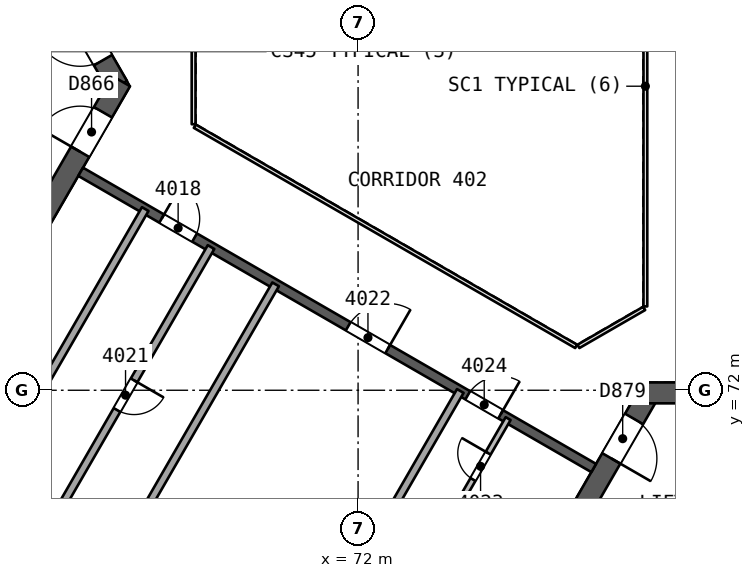
"""IFC4 building model, lengths in metres.
Left out: names, types, materials, properties, quantities, classifications, styles, units other than length and angle.
Written with IfcOpenShell. Run it as: python <this file> out.ifc"""

import sys

from ifc_helpers import new_model, si_unit, direction, frame, frame_2d, origin, place, context, subcontext, project, spatial, rectangle, extrude, element, fill, save


model = new_model("IFC4")
c1 = context("Model", 3, precision=1e-05, world=origin(), true_north=direction((0.0, 1.0)))
c2 = subcontext(c1, "Body", "Model", "MODEL_VIEW")
j1 = project(units=[si_unit("LENGTHUNIT", "METRE"), si_unit("PLANEANGLEUNIT", "RADIAN")], contexts=[c1])
p1 = place(None, origin())
s1 = spatial("IfcSite", under=j1, at=p1, CompositionType="ELEMENT")
p2 = place(p1, origin())
s2 = spatial("IfcBuilding", under=s1, at=p2, CompositionType="ELEMENT")
p3 = place(p2, frame((0.0, 0.0, 167.4)))
s3 = spatial("IfcBuildingStorey", under=s2, at=p3, CompositionType="ELEMENT", Elevation=167.4)
p4 = place(p3, frame((65.682, 80.0, 0.0), z_axis=(0.0, 0.0, 1.0), x_axis=(-0.500000202252, 0.866025287014, 0.0)))
e1 = element("IfcWall", 1, at=p4, inside=s3, PredefinedType="SHEAR", context=c2, shape_type="SweptSolid", body=[
    extrude(rectangle(XDim=10.221, YDim=0.55, at=frame_2d((5.111, 0.0))), origin(), (0.0, 0.0, 1.0), 3.7),
])
p5 = place(p4, frame((0.791, 0.0, 0.0)))
e2 = element("IfcOpeningElement", 2, at=p5, cuts=e1, PredefinedType="OPENING", context=c2, shape_type="SweptSolid", body=[
    extrude(rectangle(XDim=1.2, YDim=2.1, at=frame_2d((0.6, 1.05))), frame((0.0, 0.286, 0.0), z_axis=(0.0, -1.0, 0.0), x_axis=(1.0, 0.0, 0.0)), (0.0, 0.0, 1.0), 0.571),
])
p6 = place(p3, frame((60.709, 71.386, 0.0), z_axis=(0.0, 0.0, 1.0), x_axis=(0.500015938302, 0.866016201606, 0.0)))
e3 = element("IfcWall", 3, at=p6, inside=s3, PredefinedType="SHEAR", context=c2, shape_type="SweptSolid", body=[
    extrude(rectangle(XDim=10.105, YDim=0.55, at=frame_2d((5.053, 0.0))), origin(), (0.0, 0.0, 1.0), 3.7),
])
p7 = place(p6, frame((7.955, 0.0, 0.0)))
e4 = element("IfcOpeningElement", 4, at=p7, cuts=e3, PredefinedType="OPENING", context=c2, shape_type="SweptSolid", body=[
    extrude(rectangle(XDim=1.2, YDim=2.1, at=frame_2d((0.6, 1.05))), frame((0.0, 0.286, 0.0), z_axis=(0.0, -1.0, 0.0), x_axis=(1.0, 0.0, 0.0)), (0.0, 0.0, 1.0), 0.571),
])
p8 = place(p3, frame((79.659, 71.931, 0.0), z_axis=(0.0, 0.0, 1.0), x_axis=(-0.500000202252, -0.866025287014, 0.0)))
e5 = element("IfcWall", 5, at=p8, inside=s3, PredefinedType="SHEAR", context=c2, shape_type="SweptSolid", body=[
    extrude(rectangle(XDim=10.221, YDim=0.55, at=frame_2d((5.111, 0.0))), origin(), (0.0, 0.0, 1.0), 3.7),
])
p9 = place(p8, frame((0.791, 0.0, 0.0)))
e6 = element("IfcOpeningElement", 6, at=p9, cuts=e5, PredefinedType="OPENING", context=c2, shape_type="SweptSolid", body=[
    extrude(rectangle(XDim=1.2, YDim=2.1, at=frame_2d((0.6, 1.05))), frame((0.0, 0.286, 0.0), z_axis=(0.0, -1.0, 0.0), x_axis=(1.0, 0.0, 0.0)), (0.0, 0.0, 1.0), 0.571),
])
p10 = place(p3, frame((89.605, 71.931, 0.0), z_axis=(0.0, 0.0, 1.0), x_axis=(-1.0, 0.0, 0.0)))
e7 = element("IfcWall", 7, at=p10, inside=s3, PredefinedType="SHEAR", context=c2, shape_type="SweptSolid", body=[
    extrude(rectangle(XDim=10.105, YDim=0.55, at=frame_2d((5.052, 0.0))), origin(), (0.0, 0.0, 1.0), 3.7),
])
p11 = place(p10, frame((7.955, 0.0, 0.0)))
e8 = element("IfcOpeningElement", 8, at=p11, cuts=e7, PredefinedType="OPENING", context=c2, shape_type="SweptSolid", body=[
    extrude(rectangle(XDim=1.2, YDim=2.1, at=frame_2d((0.6, 1.05))), frame((0.0, 0.286, 0.0), z_axis=(0.0, -1.0, 0.0), x_axis=(1.0, 0.0, 0.0)), (0.0, 0.0, 1.0), 0.571),
])
p12 = place(p3, frame((64.7, 77.748, 0.0), z_axis=(0.0, 0.0, 1.0), x_axis=(0.866026492143, -0.499998114903, 0.0)))
e9 = element("IfcWall", 9, at=p12, inside=s3, PredefinedType="SHEAR", context=c2, shape_type="SweptSolid", body=[
    extrude(rectangle(XDim=15.588, YDim=0.25, at=frame_2d((7.794, 0.0))), origin(), (0.0, 0.0, 1.0), 3.25),
])
p13 = place(p12, frame((2.462, 0.0, 0.0)))
e10 = element("IfcOpeningElement", 10, at=p13, cuts=e9, PredefinedType="OPENING", context=c2, shape_type="SweptSolid", body=[
    extrude(rectangle(XDim=1.0, YDim=2.1, at=frame_2d((0.5, 1.05))), frame((0.0, 0.135, 0.0), z_axis=(0.0, -1.0, 0.0), x_axis=(1.0, 0.0, 0.0)), (0.0, 0.0, 1.0), 0.271),
])
p14 = place(p12, frame((8.129, 0.0, 0.0)))
e11 = element("IfcOpeningElement", 11, at=p14, cuts=e9, PredefinedType="OPENING", context=c2, shape_type="SweptSolid", body=[
    extrude(rectangle(XDim=1.2, YDim=2.4, at=frame_2d((0.6, 1.2))), frame((0.0, 0.135, 0.0), z_axis=(0.0, -1.0, 0.0), x_axis=(1.0, 0.0, 0.0)), (0.0, 0.0, 1.0), 0.271),
])
p15 = place(p12, frame((11.762, 0.0, 0.0)))
e12 = element("IfcOpeningElement", 12, at=p15, cuts=e9, PredefinedType="OPENING", context=c2, shape_type="SweptSolid", body=[
    extrude(rectangle(XDim=1.0, YDim=2.1, at=frame_2d((0.5, 1.05))), frame((0.0, 0.135, 0.0), z_axis=(0.0, -1.0, 0.0), x_axis=(1.0, 0.0, 0.0)), (0.0, 0.0, 1.0), 0.271),
])
p16 = place(p3, frame((68.131, 75.767, 0.0), z_axis=(0.0, 0.0, 1.0), x_axis=(-0.5000018851, -0.866024315419, 0.0)))
e13 = element("IfcWall", 13, at=p16, inside=s3, PredefinedType="PARTITIONING", context=c2, shape_type="SweptSolid", body=[
    extrude(rectangle(XDim=9.0, YDim=0.2, at=frame_2d((4.5, 0.0))), origin(), (0.0, 0.0, 1.0), 3.25),
])
p17 = place(p16, frame((4.05, 0.0, 0.0)))
e14 = element("IfcOpeningElement", 14, at=p17, cuts=e13, PredefinedType="OPENING", context=c2, shape_type="SweptSolid", body=[
    extrude(rectangle(XDim=0.9, YDim=2.1, at=frame_2d((0.45, 1.05))), frame((0.0, 0.11, 0.0), z_axis=(0.0, -1.0, 0.0), x_axis=(1.0, 0.0, 0.0)), (0.0, 0.0, 1.0), 0.221),
])
p18 = place(p3, frame((61.899, 68.973, 0.0), z_axis=(0.0, 0.0, 1.0), x_axis=(0.5000018851, 0.866024315419, 0.0)))
e15 = element("IfcWall", 15, at=p18, inside=s3, PredefinedType="PARTITIONING", context=c2, shape_type="SweptSolid", body=[
    extrude(rectangle(XDim=9.0, YDim=0.2, at=frame_2d((4.5, 0.0))), origin(), (0.0, 0.0, 1.0), 3.25),
])
for number, where, z_axis, x_axis in (
    (16, (64.092, 64.847, 0.0), (0.0, 0.0, 1.0), (0.5, 0.866, 0.0)),
    (17, (68.951, 62.041, 0.0), (0.0, 0.0, 1.0), (0.5, 0.866, 0.0)),
):
    element("IfcWall", number, at=place(p3, frame(where, z_axis=z_axis, x_axis=x_axis)), inside=s3, PredefinedType="PARTITIONING", context=c2, shape_type="SweptSolid", body=[
        extrude(rectangle(XDim=11.477, YDim=0.2, at=frame_2d((5.739, 0.0))), origin(), (0.0, 0.0, 1.0), 3.25),
    ])
p19 = place(p3, frame((74.498, 68.743, 0.0), z_axis=(0.0, 0.0, 1.0), x_axis=(0.499987231761, 0.866032775405, 0.0)))
e18 = element("IfcWall", 18, at=p19, inside=s3, PredefinedType="PARTITIONING", context=c2, shape_type="SweptSolid", body=[
    extrude(rectangle(XDim=2.9, YDim=0.15, at=frame_2d((1.45, 0.0))), origin(), (0.0, 0.0, 1.0), 3.25),
])
p20 = place(p19, frame((1.05, 0.0, 0.0)))
e19 = element("IfcOpeningElement", 19, at=p20, cuts=e18, PredefinedType="OPENING", context=c2, shape_type="SweptSolid", body=[
    extrude(rectangle(XDim=0.8, YDim=2.1, at=frame_2d((0.4, 1.05))), frame((0.0, 0.085, 0.0), z_axis=(0.0, -1.0, 0.0), x_axis=(1.0, 0.0, 0.0)), (0.0, 0.0, 1.0), 0.171),
])
p21 = place(p3, frame((88.955, 50.32, 0.0), z_axis=(0.0, 0.0, 1.0), x_axis=(-0.866024017239, 0.50000240156, 0.0)))
e20 = element("IfcWall", 20, at=p21, inside=s3, PredefinedType="SOLIDWALL", context=c2, shape_type="SweptSolid", body=[
    extrude(rectangle(XDim=53.85, YDim=0.3, at=frame_2d((26.925, 0.0))), origin(), (0.0, 0.0, 1.0), 3.25),
])
p22 = place(p21, frame((30.557, 0.0, 0.0)))
e21 = element("IfcOpeningElement", 21, at=p22, cuts=e20, PredefinedType="OPENING", context=c2, shape_type="SweptSolid", body=[
    extrude(rectangle(XDim=2.4, YDim=2.4, at=frame_2d((1.2, 1.2))), frame((0.0, 0.161, 0.0), z_axis=(0.0, -1.0, 0.0), x_axis=(1.0, 0.0, 0.0)), (0.0, 0.0, 1.0), 0.321),
])
p23 = place(p21, frame((41.847, 0.0, 0.0)))
e22 = element("IfcOpeningElement", 22, at=p23, cuts=e20, PredefinedType="OPENING", context=c2, shape_type="SweptSolid", body=[
    extrude(rectangle(XDim=2.4, YDim=2.4, at=frame_2d((1.2, 1.2))), frame((0.0, 0.161, 0.0), z_axis=(0.0, -1.0, 0.0), x_axis=(1.0, 0.0, 0.0)), (0.0, 0.0, 1.0), 0.321),
])
p24 = place(p21, frame((10.349, 0.0, 0.0)))
e23 = element("IfcOpeningElement", 23, at=p24, cuts=e20, PredefinedType="OPENING", context=c2, shape_type="SweptSolid", body=[
    extrude(rectangle(XDim=2.4, YDim=2.4, at=frame_2d((1.2, 1.2))), frame((0.0, 0.161, 0.0), z_axis=(0.0, -1.0, 0.0), x_axis=(1.0, 0.0, 0.0)), (0.0, 0.0, 1.0), 0.321),
])
p25 = place(p21, frame((25.09, 0.0, 0.9)))
e24 = element("IfcOpeningElement", 24, at=p25, cuts=e20, PredefinedType="OPENING", context=c2, shape_type="SweptSolid", body=[
    extrude(rectangle(XDim=1.8, YDim=1.5, at=frame_2d((0.9, 0.75))), frame((0.0, 0.161, 0.0), z_axis=(0.0, -1.0, 0.0), x_axis=(1.0, 0.0, 0.0)), (0.0, 0.0, 1.0), 0.321),
])
p26 = place(p3, frame((77.135, 64.952, 0.0), z_axis=(0.0, 0.0, 1.0), x_axis=(0.866031916153, 0.499988720078, 0.0)))
e25 = element("IfcWall", 25, at=p26, inside=s3, PredefinedType="SOLIDWALL", context=c2, shape_type="SweptSolid", body=[
    extrude(rectangle(XDim=11.35, YDim=0.2, at=frame_2d((5.675, 0.0))), origin(), (0.0, 0.0, 1.0), 3.25),
])
p27 = place(p3, frame((79.56, 74.206, 0.0), z_axis=(0.0, 0.0, 1.0), x_axis=(0.0, 1.0, 0.0)))
e26 = element("IfcWall", 26, at=p27, inside=s3, PredefinedType="PARTITIONING", context=c2, shape_type="SweptSolid", body=[
    extrude(rectangle(XDim=11.588, YDim=0.1, at=frame_2d((5.794, 0.0))), origin(), (0.0, 0.0, 1.0), 3.25),
])
p28 = place(p3, frame((67.672, 81.0, 0.0), z_axis=(0.0, 0.0, 1.0), x_axis=(0.0, -1.0, 0.0)))
e27 = element("IfcWall", 27, at=p28, inside=s3, PredefinedType="PARTITIONING", context=c2, shape_type="SweptSolid", body=[
    extrude(rectangle(XDim=2.0, YDim=0.1, at=frame_2d((1.0, 0.0))), origin(), (0.0, 0.0, 1.0), 3.25),
])
p29 = place(p3, frame((67.702, 78.948, 0.0), z_axis=(0.0, 0.0, 1.0), x_axis=(0.866026658274, -0.499997827154, 0.0)))
e28 = element("IfcWall", 28, at=p29, inside=s3, PredefinedType="PARTITIONING", context=c2, shape_type="SweptSolid", body=[
    extrude(rectangle(XDim=11.588, YDim=0.1, at=frame_2d((5.794, 0.0))), origin(), (0.0, 0.0, 1.0), 3.25),
])
p30 = place(p3, frame((77.798, 73.154, 0.0), z_axis=(0.0, 0.0, 1.0), x_axis=(0.866041268327, 0.499972520799, 0.0)))
e29 = element("IfcWall", 29, at=p30, inside=s3, PredefinedType="PARTITIONING", context=c2, shape_type="SweptSolid", body=[
    extrude(rectangle(XDim=2.0, YDim=0.1, at=frame_2d((1.0, 0.0))), origin(), (0.0, 0.0, 1.0), 3.25),
])
p31 = place(p13, origin())
e30 = element("IfcDoor", 30, at=p31, inside=s3, OperationType="SINGLE_SWING_LEFT", PredefinedType="NOTDEFINED", context=c2, shape_type="SweptSolid", body=[
    extrude(rectangle(XDim=1.0, YDim=2.1, at=frame_2d((0.5, 1.05))), frame((0.0, 0.025, 0.0), z_axis=(0.0, -1.0, 0.0), x_axis=(1.0, 0.0, 0.0)), (0.0, 0.0, 1.0), 0.05),
])
fill(e10, e30)
p32 = place(p17, origin())
e31 = element("IfcDoor", 31, at=p32, inside=s3, OperationType="SINGLE_SWING_LEFT", PredefinedType="NOTDEFINED", context=c2, shape_type="SweptSolid", body=[
    extrude(rectangle(XDim=0.9, YDim=2.1, at=frame_2d((0.45, 1.05))), frame((0.0, 0.025, 0.0), z_axis=(0.0, -1.0, 0.0), x_axis=(1.0, 0.0, 0.0)), (0.0, 0.0, 1.0), 0.05),
])
fill(e14, e31)
p33 = place(p14, origin())
e32 = element("IfcDoor", 32, at=p33, inside=s3, OperationType="SINGLE_SWING_RIGHT", PredefinedType="NOTDEFINED", context=c2, shape_type="SweptSolid", body=[
    extrude(rectangle(XDim=1.2, YDim=2.4, at=frame_2d((0.6, 1.2))), frame((0.0, 0.025, 0.0), z_axis=(0.0, -1.0, 0.0), x_axis=(1.0, 0.0, 0.0)), (0.0, 0.0, 1.0), 0.05),
])
fill(e11, e32)
p34 = place(p20, origin())
e33 = element("IfcDoor", 33, at=p34, inside=s3, OperationType="SINGLE_SWING_RIGHT", PredefinedType="NOTDEFINED", context=c2, shape_type="SweptSolid", body=[
    extrude(rectangle(XDim=0.8, YDim=2.1, at=frame_2d((0.4, 1.05))), frame((0.0, 0.025, 0.0), z_axis=(0.0, -1.0, 0.0), x_axis=(1.0, 0.0, 0.0)), (0.0, 0.0, 1.0), 0.05),
])
fill(e19, e33)
p35 = place(p15, origin())
e34 = element("IfcDoor", 34, at=p35, inside=s3, OperationType="SINGLE_SWING_RIGHT", PredefinedType="NOTDEFINED", context=c2, shape_type="SweptSolid", body=[
    extrude(rectangle(XDim=1.0, YDim=2.1, at=frame_2d((0.5, 1.05))), frame((0.0, 0.025, 0.0), z_axis=(0.0, -1.0, 0.0), x_axis=(1.0, 0.0, 0.0)), (0.0, 0.0, 1.0), 0.05),
])
fill(e12, e34)
p36 = place(p5, origin())
e35 = element("IfcDoor", 35, at=p36, inside=s3, OperationType="SINGLE_SWING_RIGHT", PredefinedType="NOTDEFINED", context=c2, shape_type="SweptSolid", body=[
    extrude(rectangle(XDim=1.2, YDim=2.1, at=frame_2d((0.6, 1.05))), frame((0.0, 0.025, 0.0), z_axis=(0.0, -1.0, 0.0), x_axis=(1.0, 0.0, 0.0)), (0.0, 0.0, 1.0), 0.05),
])
fill(e2, e35)
p37 = place(p7, origin())
e36 = element("IfcDoor", 36, at=p37, inside=s3, OperationType="SINGLE_SWING_LEFT", PredefinedType="NOTDEFINED", context=c2, shape_type="SweptSolid", body=[
    extrude(rectangle(XDim=1.2, YDim=2.1, at=frame_2d((0.6, 1.05))), frame((0.0, 0.025, 0.0), z_axis=(0.0, -1.0, 0.0), x_axis=(1.0, 0.0, 0.0)), (0.0, 0.0, 1.0), 0.05),
])
fill(e4, e36)
p38 = place(p9, origin())
e37 = element("IfcDoor", 37, at=p38, inside=s3, OperationType="SINGLE_SWING_RIGHT", PredefinedType="NOTDEFINED", context=c2, shape_type="SweptSolid", body=[
    extrude(rectangle(XDim=1.2, YDim=2.1, at=frame_2d((0.6, 1.05))), frame((0.0, 0.025, 0.0), z_axis=(0.0, -1.0, 0.0), x_axis=(1.0, 0.0, 0.0)), (0.0, 0.0, 1.0), 0.05),
])
fill(e6, e37)
save(model, sys.argv[1])
